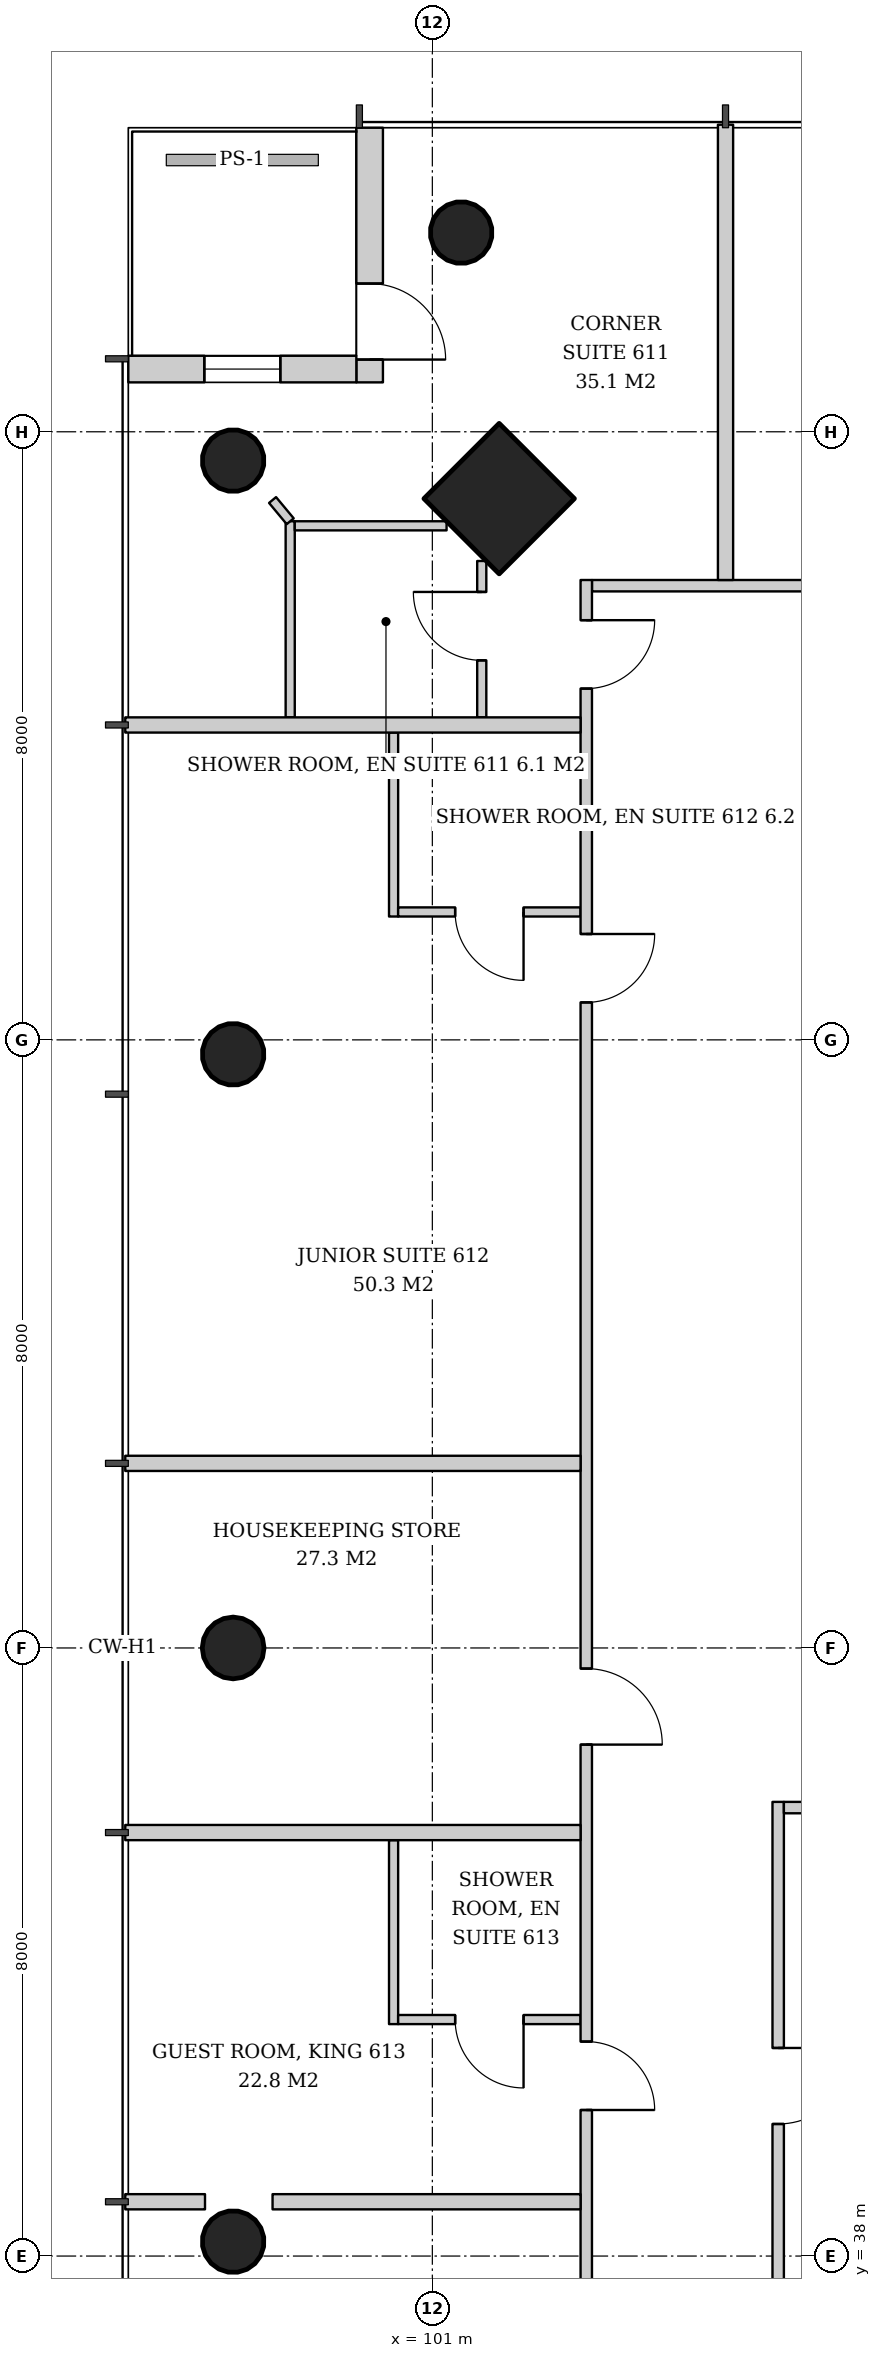
"""IFC4 building model, lengths in metres.
Left out: names, types, materials, properties, quantities, classifications, styles, units other than length and angle.
Written with IfcOpenShell. Run it as: python <this file> out.ifc"""

import sys

from ifc_helpers import new_model, si_unit, direction, frame, frame_2d, origin, origin_2d, place, context, subcontext, project, spatial, rectangle, hollow_circle, extrude, element, fill, save


model = new_model("IFC4")
c1 = context("Model", 3, precision=1e-05, world=origin(), true_north=direction((0.0, 1.0)))
c2 = subcontext(c1, "Body", "Model", "MODEL_VIEW")
j1 = project(units=[si_unit("LENGTHUNIT", "METRE"), si_unit("PLANEANGLEUNIT", "RADIAN")], contexts=[c1])
p1 = place(None, origin())
s1 = spatial("IfcSite", under=j1, at=p1, CompositionType="ELEMENT")
p2 = place(p1, origin())
s2 = spatial("IfcBuilding", under=s1, at=p2, CompositionType="ELEMENT")
p3 = place(p2, frame((0.0, 0.0, 28.6)))
s3 = spatial("IfcBuildingStorey", under=s2, at=p3, CompositionType="ELEMENT", Elevation=28.6)
p4 = place(p3, frame((101.828, 61.172, 0.0), z_axis=(0.043032401563, -0.043032401563, 0.998146494675), x_axis=(0.707106781187, 0.707106781187, 0.0)))
e1 = element("IfcColumn", 1, at=p4, inside=s3, PredefinedType="COLUMN", context=c2, shape_type="SweptSolid", body=[
    extrude(rectangle(XDim=1.4, YDim=1.4, at=origin_2d()), origin(), (0.0, 0.0, 1.0), 3.807),
])
for number, where, z_axis, x_axis in (
    (2, (101.328, 64.672, 0.0), (0.043, -0.043, 0.998), (0.707, 0.707, 0.0)),
    (3, (98.328, 61.672, 0.0), (0.043, -0.043, 0.998), (0.707, 0.707, 0.0)),
):
    element("IfcColumn", number, at=place(p3, frame(where, z_axis=z_axis, x_axis=x_axis)), inside=s3, PredefinedType="COLUMN", context=c2, shape_type="SweptSolid", body=[
        extrude(hollow_circle(Radius=0.406, WallThickness=0.03, at=origin_2d()), origin(), (0.0, 0.0, 1.0), 3.807),
    ])
p5 = place(p3, frame((98.328, 53.836, 0.0), z_axis=(0.04306234503, -0.02149908433, 0.998841040313), x_axis=(0.446680166538, 0.894693706707, 0.0)))
e4 = element("IfcColumn", 4, at=p5, inside=s3, PredefinedType="COLUMN", context=c2, shape_type="SweptSolid", body=[
    extrude(hollow_circle(Radius=0.406, WallThickness=0.03, at=origin_2d()), origin(), (0.0, 0.0, 1.0), 3.804),
])
p6 = place(p3, frame((98.328, 46.0, 0.0), z_axis=(0.043072300418, 0.0, 0.999071957837), x_axis=(0.0, 1.0, 0.0)))
e5 = element("IfcColumn", 5, at=p6, inside=s3, PredefinedType="COLUMN", context=c2, shape_type="SweptSolid", body=[
    extrude(hollow_circle(Radius=0.406, WallThickness=0.03, at=origin_2d()), origin(), (0.0, 0.0, 1.0), 3.803),
])
p7 = place(p3, frame((98.328, 38.164, 0.0), z_axis=(0.04306234503, 0.02149908433, 0.998841040313), x_axis=(-0.446680166538, 0.894693706707, 0.0)))
e6 = element("IfcColumn", 6, at=p7, inside=s3, PredefinedType="COLUMN", context=c2, shape_type="SweptSolid", body=[
    extrude(hollow_circle(Radius=0.406, WallThickness=0.03, at=origin_2d()), origin(), (0.0, 0.0, 1.0), 3.804),
])
p8 = place(p3, frame((100.175, 66.0, 0.0), z_axis=(0.0, 0.0, 1.0), x_axis=(0.0, -1.0, 0.0)))
e7 = element("IfcWall", 7, at=p8, inside=s3, PredefinedType="SOLIDWALL", context=c2, shape_type="SweptSolid", body=[
    extrude(rectangle(XDim=3.35, YDim=0.35, at=frame_2d((1.675, 0.0))), origin(), (0.0, 0.0, 1.0), 3.6),
])
p9 = place(p8, frame((2.05, 0.0, 0.0)))
e8 = element("IfcOpeningElement", 8, at=p9, cuts=e7, PredefinedType="OPENING", context=c2, shape_type="SweptSolid", body=[
    extrude(rectangle(XDim=1.0, YDim=2.4, at=frame_2d((0.5, 1.2))), frame((0.0, 0.185, 0.0), z_axis=(0.0, -1.0, 0.0), x_axis=(1.0, 0.0, 0.0)), (0.0, 0.0, 1.0), 0.37),
])
p10 = place(p3, frame((100.0, 62.825, 0.0), z_axis=(0.0, 0.0, 1.0), x_axis=(-1.0, 0.0, 0.0)))
e9 = element("IfcWall", 9, at=p10, inside=s3, PredefinedType="SOLIDWALL", context=c2, shape_type="SweptSolid", body=[
    extrude(rectangle(XDim=3.0, YDim=0.35, at=frame_2d((1.5, 0.0))), origin(), (0.0, 0.0, 1.0), 3.6),
])
p11 = place(p10, frame((1.0, 0.0, 0.9)))
e10 = element("IfcOpeningElement", 10, at=p11, cuts=e9, PredefinedType="OPENING", context=c2, shape_type="SweptSolid", body=[
    extrude(rectangle(XDim=1.0, YDim=2.4, at=frame_2d((0.5, 1.2))), frame((0.0, 0.185, 0.0), z_axis=(0.0, -1.0, 0.0), x_axis=(1.0, 0.0, 0.0)), (0.0, 0.0, 1.0), 0.37),
])
p12 = place(p3, frame((105.55, 43.975, 0.0), z_axis=(0.0, 0.0, 1.0), x_axis=(0.0, -1.0, 0.0)))
e11 = element("IfcWall", 11, at=p12, inside=s3, PredefinedType="PARTITIONING", context=c2, shape_type="SweptSolid", body=[
    extrude(rectangle(XDim=7.475, YDim=0.15, at=frame_2d((3.738, 0.0))), origin(), (0.0, 0.0, 1.0), 2.847),
])
p13 = place(p12, frame((3.238, 0.0, 0.0)))
e12 = element("IfcOpeningElement", 12, at=p13, cuts=e11, PredefinedType="OPENING", context=c2, shape_type="SweptSolid", body=[
    extrude(rectangle(XDim=1.0, YDim=2.1, at=frame_2d((0.5, 1.05))), frame((0.0, 0.085, 0.0), z_axis=(0.0, -1.0, 0.0), x_axis=(1.0, 0.0, 0.0)), (0.0, 0.0, 1.0), 0.17),
])
p14 = place(p3, frame((107.5, 43.9, 0.0), z_axis=(0.0, 0.0, 1.0), x_axis=(-1.0, 0.0, 0.0)))
e13 = element("IfcWall", 13, at=p14, inside=s3, PredefinedType="PARTITIONING", context=c2, shape_type="SweptSolid", body=[
    extrude(rectangle(XDim=1.875, YDim=0.15, at=frame_2d((0.938, 0.0))), origin(), (0.0, 0.0, 1.0), 3.6),
])
p15 = place(p3, frame((131.05, 59.975, 0.0), z_axis=(0.0, 0.0, 1.0), x_axis=(-1.0, 0.0, 0.0)))
e14 = element("IfcWall", 14, at=p15, inside=s3, PredefinedType="PARTITIONING", context=c2, shape_type="SweptSolid", body=[
    extrude(rectangle(XDim=27.95, YDim=0.15, at=frame_2d((13.975, 0.0))), origin(), (0.0, 0.0, 1.0), 2.8),
])
p16 = place(p15, frame((0.529, 0.0, 0.0)))
e15 = element("IfcOpeningElement", 15, at=p16, cuts=e14, PredefinedType="OPENING", context=c2, shape_type="SweptSolid", body=[
    extrude(rectangle(XDim=0.9, YDim=2.1, at=frame_2d((0.45, 1.05))), frame((0.0, 0.085, 0.0), z_axis=(0.0, -1.0, 0.0), x_axis=(1.0, 0.0, 0.0)), (0.0, 0.0, 1.0), 0.17),
])
p17 = place(p15, frame((7.971, 0.0, 0.0)))
e16 = element("IfcOpeningElement", 16, at=p17, cuts=e14, PredefinedType="OPENING", context=c2, shape_type="SweptSolid", body=[
    extrude(rectangle(XDim=0.9, YDim=2.1, at=frame_2d((0.45, 1.05))), frame((0.0, 0.085, 0.0), z_axis=(0.0, -1.0, 0.0), x_axis=(1.0, 0.0, 0.0)), (0.0, 0.0, 1.0), 0.17),
])
p18 = place(p15, frame((14.371, 0.0, 0.0)))
e17 = element("IfcOpeningElement", 17, at=p18, cuts=e14, PredefinedType="OPENING", context=c2, shape_type="SweptSolid", body=[
    extrude(rectangle(XDim=0.9, YDim=2.1, at=frame_2d((0.45, 1.05))), frame((0.0, 0.085, 0.0), z_axis=(0.0, -1.0, 0.0), x_axis=(1.0, 0.0, 0.0)), (0.0, 0.0, 1.0), 0.17),
])
p19 = place(p15, frame((17.686, 0.0, 0.0)))
e18 = element("IfcOpeningElement", 18, at=p19, cuts=e14, PredefinedType="OPENING", context=c2, shape_type="SweptSolid", body=[
    extrude(rectangle(XDim=0.9, YDim=2.1, at=frame_2d((0.45, 1.05))), frame((0.0, 0.085, 0.0), z_axis=(0.0, -1.0, 0.0), x_axis=(1.0, 0.0, 0.0)), (0.0, 0.0, 1.0), 0.17),
])
p20 = place(p15, frame((24.086, 0.0, 0.0)))
e19 = element("IfcOpeningElement", 19, at=p20, cuts=e14, PredefinedType="OPENING", context=c2, shape_type="SweptSolid", body=[
    extrude(rectangle(XDim=0.9, YDim=2.1, at=frame_2d((0.45, 1.05))), frame((0.0, 0.085, 0.0), z_axis=(0.0, -1.0, 0.0), x_axis=(1.0, 0.0, 0.0)), (0.0, 0.0, 1.0), 0.17),
])
p21 = place(p3, frame((104.857, 60.05, 0.0), z_axis=(0.0, 0.0, 1.0), x_axis=(0.0, 1.0, 0.0)))
e20 = element("IfcWall", 20, at=p21, inside=s3, PredefinedType="PARTITIONING", context=c2, shape_type="SweptSolid", body=[
    extrude(rectangle(XDim=5.99, YDim=0.2, at=frame_2d((2.995, 0.0))), origin(), (0.0, 0.0, 1.0), 3.05),
])
p22 = place(p3, frame((101.65, 58.243, 0.0), z_axis=(0.0, 0.0, 1.0), x_axis=(0.0, 1.0, 0.0)))
e21 = element("IfcWall", 21, at=p22, inside=s3, PredefinedType="PARTITIONING", context=c2, shape_type="SweptSolid", body=[
    extrude(rectangle(XDim=2.057, YDim=0.12, at=frame_2d((1.029, 0.0))), origin(), (0.0, 0.0, 1.0), 3.6),
])
p23 = place(p22, frame((0.75, 0.0, 0.0)))
e22 = element("IfcOpeningElement", 22, at=p23, cuts=e21, PredefinedType="OPENING", context=c2, shape_type="SweptSolid", body=[
    extrude(rectangle(XDim=0.9, YDim=2.1, at=frame_2d((0.45, 1.05))), frame((0.0, 0.07, 0.0), z_axis=(0.0, -1.0, 0.0), x_axis=(1.0, 0.0, 0.0)), (0.0, 0.0, 1.0), 0.14),
])
p24 = place(p3, frame((99.13, 58.243, 0.0), z_axis=(0.0, 0.0, 1.0), x_axis=(0.0, 1.0, 0.0)))
e23 = element("IfcWall", 23, at=p24, inside=s3, PredefinedType="PARTITIONING", context=c2, shape_type="SweptSolid", body=[
    extrude(rectangle(XDim=2.58, YDim=0.12, at=frame_2d((1.29, 0.0))), origin(), (0.0, 0.0, 1.0), 3.6),
])
p25 = place(p3, frame((101.187, 60.763, 0.0), z_axis=(0.0, 0.0, 1.0), x_axis=(-1.0, 0.0, 0.0)))
e24 = element("IfcWall", 24, at=p25, inside=s3, PredefinedType="PARTITIONING", context=c2, shape_type="SweptSolid", body=[
    extrude(rectangle(XDim=1.997, YDim=0.12, at=frame_2d((0.999, 0.0))), origin(), (0.0, 0.0, 1.0), 3.6),
])
p26 = place(p3, frame((100.49, 58.043, 0.0), z_axis=(0.0, 0.0, 1.0), x_axis=(0.0, -1.0, 0.0)))
e25 = element("IfcWall", 25, at=p26, inside=s3, PredefinedType="PARTITIONING", context=c2, shape_type="SweptSolid", body=[
    extrude(rectangle(XDim=2.42, YDim=0.12, at=frame_2d((1.21, 0.0))), origin(), (0.0, 0.0, 1.0), 3.6),
])
p27 = place(p3, frame((102.95, 55.683, 0.0), z_axis=(0.0, 0.0, 1.0), x_axis=(-1.0, 0.0, 0.0)))
e26 = element("IfcWall", 26, at=p27, inside=s3, PredefinedType="PARTITIONING", context=c2, shape_type="SweptSolid", body=[
    extrude(rectangle(XDim=2.4, YDim=0.12, at=frame_2d((1.2, 0.0))), origin(), (0.0, 0.0, 1.0), 2.847),
])
p28 = place(p27, frame((0.75, 0.0, 0.0)))
e27 = element("IfcOpeningElement", 27, at=p28, cuts=e26, PredefinedType="OPENING", context=c2, shape_type="SweptSolid", body=[
    extrude(rectangle(XDim=0.9, YDim=2.1, at=frame_2d((0.45, 1.05))), frame((0.0, 0.07, 0.0), z_axis=(0.0, -1.0, 0.0), x_axis=(1.0, 0.0, 0.0)), (0.0, 0.0, 1.0), 0.14),
])
p29 = place(p3, frame((100.49, 43.471, 0.0), z_axis=(0.0, 0.0, 1.0), x_axis=(0.0, -1.0, 0.0)))
e28 = element("IfcWall", 28, at=p29, inside=s3, PredefinedType="PARTITIONING", context=c2, shape_type="SweptSolid", body=[
    extrude(rectangle(XDim=2.42, YDim=0.12, at=frame_2d((1.21, 0.0))), origin(), (0.0, 0.0, 1.0), 2.847),
])
p30 = place(p3, frame((102.95, 41.111, 0.0), z_axis=(0.0, 0.0, 1.0), x_axis=(-1.0, 0.0, 0.0)))
e29 = element("IfcWall", 29, at=p30, inside=s3, PredefinedType="PARTITIONING", context=c2, shape_type="SweptSolid", body=[
    extrude(rectangle(XDim=2.4, YDim=0.12, at=frame_2d((1.2, 0.0))), origin(), (0.0, 0.0, 1.0), 3.6),
])
p31 = place(p30, frame((0.75, 0.0, 0.0)))
e30 = element("IfcOpeningElement", 30, at=p31, cuts=e29, PredefinedType="OPENING", context=c2, shape_type="SweptSolid", body=[
    extrude(rectangle(XDim=0.9, YDim=2.1, at=frame_2d((0.45, 1.05))), frame((0.0, 0.07, 0.0), z_axis=(0.0, -1.0, 0.0), x_axis=(1.0, 0.0, 0.0)), (0.0, 0.0, 1.0), 0.14),
])
p32 = place(p3, frame((103.025, 60.05, 0.0), z_axis=(0.0, 0.0, 1.0), x_axis=(0.0, -1.0, 0.0)))
e31 = element("IfcWall", 31, at=p32, inside=s3, PredefinedType="PARTITIONING", context=c2, shape_type="SweptSolid", body=[
    extrude(rectangle(XDim=27.95, YDim=0.15, at=frame_2d((13.975, 0.0))), origin(), (0.0, 0.0, 1.0), 2.8),
])
p33 = place(p32, frame((0.529, 0.0, 0.0)))
e32 = element("IfcOpeningElement", 32, at=p33, cuts=e31, PredefinedType="OPENING", context=c2, shape_type="SweptSolid", body=[
    extrude(rectangle(XDim=0.9, YDim=2.1, at=frame_2d((0.45, 1.05))), frame((0.0, 0.085, 0.0), z_axis=(0.0, -1.0, 0.0), x_axis=(1.0, 0.0, 0.0)), (0.0, 0.0, 1.0), 0.17),
])
p34 = place(p32, frame((4.657, 0.0, 0.0)))
e33 = element("IfcOpeningElement", 33, at=p34, cuts=e31, PredefinedType="OPENING", context=c2, shape_type="SweptSolid", body=[
    extrude(rectangle(XDim=0.9, YDim=2.1, at=frame_2d((0.45, 1.05))), frame((0.0, 0.085, 0.0), z_axis=(0.0, -1.0, 0.0), x_axis=(1.0, 0.0, 0.0)), (0.0, 0.0, 1.0), 0.17),
])
p35 = place(p32, frame((14.322, 0.0, 0.0)))
e34 = element("IfcOpeningElement", 34, at=p35, cuts=e31, PredefinedType="OPENING", context=c2, shape_type="SweptSolid", body=[
    extrude(rectangle(XDim=1.0, YDim=2.1, at=frame_2d((0.5, 1.05))), frame((0.0, 0.085, 0.0), z_axis=(0.0, -1.0, 0.0), x_axis=(1.0, 0.0, 0.0)), (0.0, 0.0, 1.0), 0.17),
])
p36 = place(p32, frame((19.229, 0.0, 0.0)))
e35 = element("IfcOpeningElement", 35, at=p36, cuts=e31, PredefinedType="OPENING", context=c2, shape_type="SweptSolid", body=[
    extrude(rectangle(XDim=0.9, YDim=2.1, at=frame_2d((0.45, 1.05))), frame((0.0, 0.085, 0.0), z_axis=(0.0, -1.0, 0.0), x_axis=(1.0, 0.0, 0.0)), (0.0, 0.0, 1.0), 0.17),
])
p37 = place(p32, frame((22.543, 0.0, 0.0)))
e36 = element("IfcOpeningElement", 36, at=p37, cuts=e31, PredefinedType="OPENING", context=c2, shape_type="SweptSolid", body=[
    extrude(rectangle(XDim=0.9, YDim=2.1, at=frame_2d((0.45, 1.05))), frame((0.0, 0.085, 0.0), z_axis=(0.0, -1.0, 0.0), x_axis=(1.0, 0.0, 0.0)), (0.0, 0.0, 1.0), 0.17),
])
p38 = place(p3, frame((102.95, 58.143, 0.0), z_axis=(0.0, 0.0, 1.0), x_axis=(-1.0, 0.0, 0.0)))
e37 = element("IfcWall", 37, at=p38, inside=s3, PredefinedType="PARTITIONING", context=c2, shape_type="SweptSolid", body=[
    extrude(rectangle(XDim=5.99, YDim=0.2, at=frame_2d((2.995, 0.0))), origin(), (0.0, 0.0, 1.0), 2.847),
])
for number, where, z_axis, x_axis in (
    (38, (102.95, 48.428, 0.0), (0.0, 0.0, 1.0), (-1.0, 0.0, 0.0)),
    (39, (102.95, 43.572, 0.0), (0.0, 0.0, 1.0), (-1.0, 0.0, 0.0)),
):
    element("IfcWall", number, at=place(p3, frame(where, z_axis=z_axis, x_axis=x_axis)), inside=s3, PredefinedType="PARTITIONING", context=c2, shape_type="SweptSolid", body=[
        extrude(rectangle(XDim=5.99, YDim=0.2, at=frame_2d((2.995, 0.0))), origin(), (0.0, 0.0, 1.0), 3.05),
    ])
p39 = place(p3, frame((102.95, 38.714, 0.0), z_axis=(0.0, 0.0, 1.0), x_axis=(-1.0, 0.0, 0.0)))
e40 = element("IfcWall", 40, at=p39, inside=s3, PredefinedType="PARTITIONING", context=c2, shape_type="SweptSolid", body=[
    extrude(rectangle(XDim=4.052, YDim=0.2, at=frame_2d((2.026, 0.0))), origin(), (0.0, 0.0, 1.0), 3.6),
])
p40 = place(p3, frame((98.009, 38.714, 0.0), z_axis=(0.0, 0.0, 1.0), x_axis=(-1.0, 0.0, 0.0)))
e41 = element("IfcWall", 41, at=p40, inside=s3, PredefinedType="PARTITIONING", context=c2, shape_type="SweptSolid", body=[
    extrude(rectangle(XDim=1.049, YDim=0.2, at=frame_2d((0.524, 0.0))), origin(), (0.0, 0.0, 1.0), 3.6),
])
p41 = place(p3, frame((99.13, 60.823, 0.0), z_axis=(0.0, 0.0, 1.0), x_axis=(-0.638860529582, 0.76932257457, 0.0)))
e42 = element("IfcWall", 42, at=p41, inside=s3, PredefinedType="PARTITIONING", context=c2, shape_type="SweptSolid", body=[
    extrude(rectangle(XDim=0.363, YDim=0.12, at=frame_2d((0.182, 0.0))), origin(), (0.0, 0.0, 1.0), 3.6),
])
p42 = place(p9, origin())
e43 = element("IfcDoor", 43, at=p42, inside=s3, OperationType="SINGLE_SWING_RIGHT", PredefinedType="DOOR", context=c2, shape_type="SweptSolid", body=[
    extrude(rectangle(XDim=1.0, YDim=2.4, at=frame_2d((0.5, 1.2))), frame((0.0, 0.025, 0.0), z_axis=(0.0, -1.0, 0.0), x_axis=(1.0, 0.0, 0.0)), (0.0, 0.0, 1.0), 0.05),
])
fill(e8, e43)
p43 = place(p11, origin())
e44 = element("IfcWindow", 44, at=p43, inside=s3, PartitioningType="SINGLE_PANEL", PredefinedType="WINDOW", context=c2, shape_type="SweptSolid", body=[
    extrude(rectangle(XDim=1.0, YDim=2.4, at=frame_2d((0.5, 1.2))), frame((0.0, 0.03, 0.0), z_axis=(0.0, -1.0, 0.0), x_axis=(1.0, 0.0, 0.0)), (0.0, 0.0, 1.0), 0.06),
])
fill(e10, e44)
p44 = place(p13, origin())
e45 = element("IfcDoor", 45, at=p44, inside=s3, OperationType="SINGLE_SWING_LEFT", PredefinedType="DOOR", context=c2, shape_type="SweptSolid", body=[
    extrude(rectangle(XDim=1.0, YDim=2.1, at=frame_2d((0.5, 1.05))), frame((0.0, 0.025, 0.0), z_axis=(0.0, -1.0, 0.0), x_axis=(1.0, 0.0, 0.0)), (0.0, 0.0, 1.0), 0.05),
])
fill(e12, e45)
p45 = place(p23, origin())
e46 = element("IfcDoor", 46, at=p45, inside=s3, OperationType="SINGLE_SWING_RIGHT", PredefinedType="DOOR", context=c2, shape_type="SweptSolid", body=[
    extrude(rectangle(XDim=0.9, YDim=2.1, at=frame_2d((0.45, 1.05))), frame((0.0, 0.025, 0.0), z_axis=(0.0, -1.0, 0.0), x_axis=(1.0, 0.0, 0.0)), (0.0, 0.0, 1.0), 0.05),
])
fill(e22, e46)
p46 = place(p28, origin())
e47 = element("IfcDoor", 47, at=p46, inside=s3, OperationType="SINGLE_SWING_LEFT", PredefinedType="DOOR", context=c2, shape_type="SweptSolid", body=[
    extrude(rectangle(XDim=0.9, YDim=2.1, at=frame_2d((0.45, 1.05))), frame((0.0, 0.025, 0.0), z_axis=(0.0, -1.0, 0.0), x_axis=(1.0, 0.0, 0.0)), (0.0, 0.0, 1.0), 0.05),
])
fill(e27, e47)
p47 = place(p31, origin())
e48 = element("IfcDoor", 48, at=p47, inside=s3, OperationType="SINGLE_SWING_LEFT", PredefinedType="DOOR", context=c2, shape_type="SweptSolid", body=[
    extrude(rectangle(XDim=0.9, YDim=2.1, at=frame_2d((0.45, 1.05))), frame((0.0, 0.025, 0.0), z_axis=(0.0, -1.0, 0.0), x_axis=(1.0, 0.0, 0.0)), (0.0, 0.0, 1.0), 0.05),
])
fill(e30, e48)
p48 = place(p33, origin())
e49 = element("IfcDoor", 49, at=p48, inside=s3, OperationType="SINGLE_SWING_LEFT", PredefinedType="DOOR", context=c2, shape_type="SweptSolid", body=[
    extrude(rectangle(XDim=0.9, YDim=2.1, at=frame_2d((0.45, 1.05))), frame((0.0, 0.025, 0.0), z_axis=(0.0, -1.0, 0.0), x_axis=(1.0, 0.0, 0.0)), (0.0, 0.0, 1.0), 0.05),
])
fill(e32, e49)
p49 = place(p34, origin())
e50 = element("IfcDoor", 50, at=p49, inside=s3, OperationType="SINGLE_SWING_LEFT", PredefinedType="DOOR", context=c2, shape_type="SweptSolid", body=[
    extrude(rectangle(XDim=0.9, YDim=2.1, at=frame_2d((0.45, 1.05))), frame((0.0, 0.025, 0.0), z_axis=(0.0, -1.0, 0.0), x_axis=(1.0, 0.0, 0.0)), (0.0, 0.0, 1.0), 0.05),
])
fill(e33, e50)
p50 = place(p35, origin())
e51 = element("IfcDoor", 51, at=p50, inside=s3, OperationType="SINGLE_SWING_RIGHT", PredefinedType="DOOR", context=c2, shape_type="SweptSolid", body=[
    extrude(rectangle(XDim=1.0, YDim=2.1, at=frame_2d((0.5, 1.05))), frame((0.0, 0.025, 0.0), z_axis=(0.0, -1.0, 0.0), x_axis=(1.0, 0.0, 0.0)), (0.0, 0.0, 1.0), 0.05),
])
fill(e34, e51)
p51 = place(p36, origin())
e52 = element("IfcDoor", 52, at=p51, inside=s3, OperationType="SINGLE_SWING_RIGHT", PredefinedType="DOOR", context=c2, shape_type="SweptSolid", body=[
    extrude(rectangle(XDim=0.9, YDim=2.1, at=frame_2d((0.45, 1.05))), frame((0.0, 0.025, 0.0), z_axis=(0.0, -1.0, 0.0), x_axis=(1.0, 0.0, 0.0)), (0.0, 0.0, 1.0), 0.05),
])
fill(e35, e52)
save(model, sys.argv[1])
